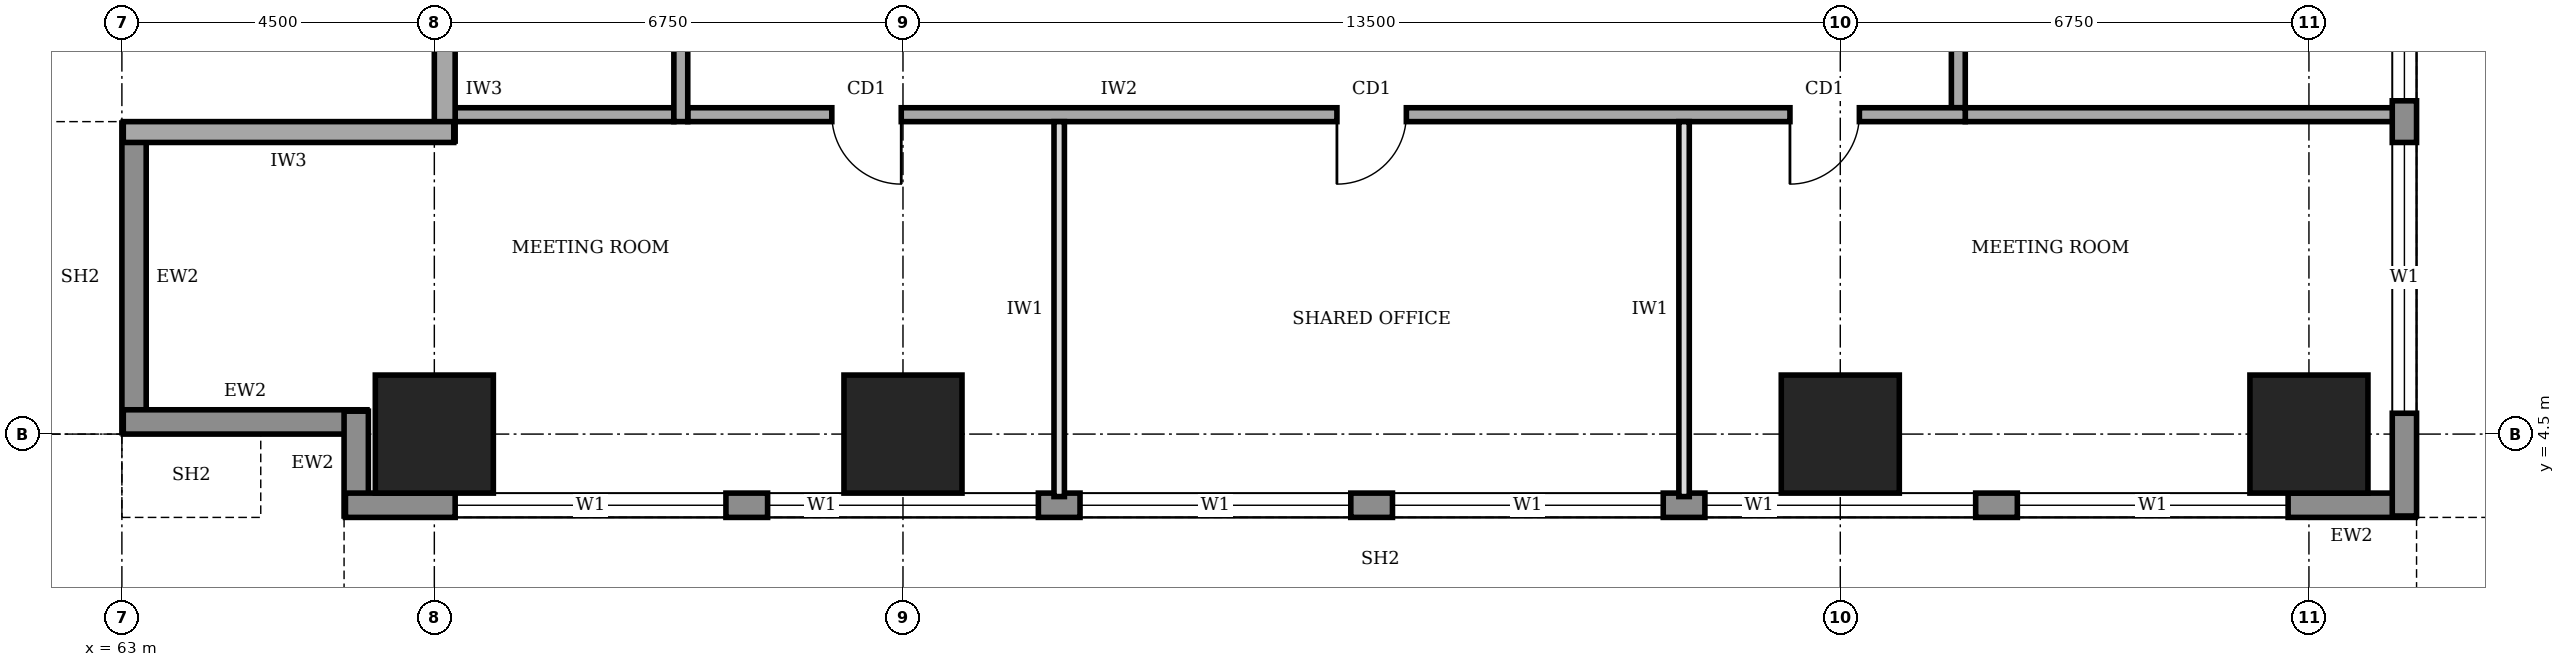
"""IFC4 building model, lengths in metres.
Left out: names, types, materials, properties, quantities, classifications, styles, units other than length and angle.
Written with IfcOpenShell. Run it as: python <this file> out.ifc"""

import sys

from ifc_helpers import new_model, si_unit, direction, frame, frame_2d, origin, origin_2d, place, context, subcontext, project, spatial, rectangle, extrude, element, fill, save


model = new_model("IFC4")
c1 = context("Model", 3, precision=1e-05, world=origin(), true_north=direction((0.0, 1.0)))
c2 = subcontext(c1, "Body", "Model", "MODEL_VIEW")
j1 = project(units=[si_unit("LENGTHUNIT", "METRE"), si_unit("PLANEANGLEUNIT", "RADIAN")], contexts=[c1])
p1 = place(None, origin())
s1 = spatial("IfcSite", under=j1, at=p1, CompositionType="ELEMENT")
p2 = place(p1, origin())
s2 = spatial("IfcBuilding", under=s1, at=p2, CompositionType="ELEMENT")
p3 = place(p2, frame((0.0, 0.0, 125.0)))
s3 = spatial("IfcBuildingStorey", under=s2, at=p3, CompositionType="ELEMENT", Elevation=125.0)
for number, where, z_axis, x_axis in (
    (1, (67.5, 4.5, 0.0), (0.0, 0.0, 1.0), (1.0, 0.0, 0.0)),
    (2, (74.25, 4.5, 0.0), (0.0, 0.0, 1.0), (1.0, 0.0, 0.0)),
    (3, (87.75, 4.5, 0.0), (0.0, 0.0, 1.0), (1.0, 0.0, 0.0)),
    (4, (94.5, 4.5, 0.0), (0.0, 0.0, 1.0), (1.0, 0.0, 0.0)),
):
    element("IfcColumn", number, at=place(p3, frame(where, z_axis=z_axis, x_axis=x_axis)), inside=s3, PredefinedType="COLUMN", context=c2, shape_type="SweptSolid", body=[
        extrude(rectangle(XDim=1.7, YDim=1.7, at=origin_2d()), origin(), (0.0, 0.0, 1.0), 4.0),
    ])
p4 = place(p3, frame((63.175, 8.98, 0.0), z_axis=(0.0, 0.0, 1.0), x_axis=(0.0, -1.0, 0.0)))
e5 = element("IfcWall", 5, at=p4, inside=s3, PredefinedType="STANDARD", context=c2, shape_type="SweptSolid", body=[
    extrude(rectangle(XDim=4.46, YDim=0.35, at=frame_2d((2.23, 0.0))), origin(), (0.0, 0.0, 1.0), 3.75),
])
p5 = place(p3, frame((63.02, 4.675, 0.0), z_axis=(0.0, 0.0, 1.0), x_axis=(1.0, 0.0, 0.0)))
e6 = element("IfcWall", 6, at=p5, inside=s3, PredefinedType="STANDARD", context=c2, shape_type="SweptSolid", body=[
    extrude(rectangle(XDim=3.51, YDim=0.35, at=frame_2d((1.755, 0.0))), origin(), (0.0, 0.0, 1.0), 2.85),
])
p6 = place(p3, frame((66.375, 4.83, 0.0), z_axis=(0.0, 0.0, 1.0), x_axis=(0.0, -1.0, 0.0)))
e7 = element("IfcWall", 7, at=p6, inside=s3, PredefinedType="STANDARD", context=c2, shape_type="SweptSolid", body=[
    extrude(rectangle(XDim=1.51, YDim=0.35, at=frame_2d((0.755, 0.0))), origin(), (0.0, 0.0, 1.0), 3.75),
])
p7 = place(p3, frame((66.22, 3.475, 0.0), z_axis=(0.0, 0.0, 1.0), x_axis=(1.0, 0.0, 0.0)))
e8 = element("IfcWall", 8, at=p7, inside=s3, PredefinedType="STANDARD", context=c2, shape_type="SweptSolid", body=[
    extrude(rectangle(XDim=29.81, YDim=0.35, at=frame_2d((14.905, 0.0))), origin(), (0.0, 0.0, 1.0), 3.75),
])
p8 = place(p7, frame((1.58, 0.0, 0.9)))
e9 = element("IfcOpeningElement", 9, at=p8, cuts=e8, PredefinedType="OPENING", context=c2, shape_type="SweptSolid", body=[
    extrude(rectangle(XDim=3.9, YDim=2.2, at=frame_2d((1.95, 1.1))), frame((0.0, 0.185, 0.0), z_axis=(0.0, -1.0, 0.0), x_axis=(1.0, 0.0, 0.0)), (0.0, 0.0, 1.0), 0.37),
])
p9 = place(p7, frame((6.08, 0.0, 0.9)))
e10 = element("IfcOpeningElement", 10, at=p9, cuts=e8, PredefinedType="OPENING", context=c2, shape_type="SweptSolid", body=[
    extrude(rectangle(XDim=3.9, YDim=2.2, at=frame_2d((1.95, 1.1))), frame((0.0, 0.185, 0.0), z_axis=(0.0, -1.0, 0.0), x_axis=(1.0, 0.0, 0.0)), (0.0, 0.0, 1.0), 0.37),
])
p10 = place(p7, frame((10.58, 0.0, 0.9)))
e11 = element("IfcOpeningElement", 11, at=p10, cuts=e8, PredefinedType="OPENING", context=c2, shape_type="SweptSolid", body=[
    extrude(rectangle(XDim=3.9, YDim=2.2, at=frame_2d((1.95, 1.1))), frame((0.0, 0.185, 0.0), z_axis=(0.0, -1.0, 0.0), x_axis=(1.0, 0.0, 0.0)), (0.0, 0.0, 1.0), 0.37),
])
p11 = place(p7, frame((15.08, 0.0, 0.9)))
e12 = element("IfcOpeningElement", 12, at=p11, cuts=e8, PredefinedType="OPENING", context=c2, shape_type="SweptSolid", body=[
    extrude(rectangle(XDim=3.9, YDim=2.2, at=frame_2d((1.95, 1.1))), frame((0.0, 0.185, 0.0), z_axis=(0.0, -1.0, 0.0), x_axis=(1.0, 0.0, 0.0)), (0.0, 0.0, 1.0), 0.37),
])
p12 = place(p7, frame((19.58, 0.0, 0.9)))
e13 = element("IfcOpeningElement", 13, at=p12, cuts=e8, PredefinedType="OPENING", context=c2, shape_type="SweptSolid", body=[
    extrude(rectangle(XDim=3.9, YDim=2.2, at=frame_2d((1.95, 1.1))), frame((0.0, 0.185, 0.0), z_axis=(0.0, -1.0, 0.0), x_axis=(1.0, 0.0, 0.0)), (0.0, 0.0, 1.0), 0.37),
])
p13 = place(p7, frame((24.08, 0.0, 0.9)))
e14 = element("IfcOpeningElement", 14, at=p13, cuts=e8, PredefinedType="OPENING", context=c2, shape_type="SweptSolid", body=[
    extrude(rectangle(XDim=3.9, YDim=2.2, at=frame_2d((1.95, 1.1))), frame((0.0, 0.185, 0.0), z_axis=(0.0, -1.0, 0.0), x_axis=(1.0, 0.0, 0.0)), (0.0, 0.0, 1.0), 0.37),
])
p14 = place(p3, frame((95.875, 3.32, 0.0), z_axis=(0.0, 0.0, 1.0), x_axis=(0.0, 1.0, 0.0)))
e15 = element("IfcWall", 15, at=p14, inside=s3, PredefinedType="STANDARD", context=c2, shape_type="SweptSolid", body=[
    extrude(rectangle(XDim=33.96, YDim=0.35, at=frame_2d((16.98, 0.0))), origin(), (0.0, 0.0, 1.0), 3.75),
])
p15 = place(p14, frame((1.48, 0.0, 0.9)))
e16 = element("IfcOpeningElement", 16, at=p15, cuts=e15, PredefinedType="OPENING", context=c2, shape_type="SweptSolid", body=[
    extrude(rectangle(XDim=3.9, YDim=2.2, at=frame_2d((1.95, 1.1))), frame((0.0, 0.185, 0.0), z_axis=(0.0, -1.0, 0.0), x_axis=(1.0, 0.0, 0.0)), (0.0, 0.0, 1.0), 0.37),
])
p16 = place(p14, frame((5.98, 0.0, 0.9)))
e17 = element("IfcOpeningElement", 17, at=p16, cuts=e15, PredefinedType="OPENING", context=c2, shape_type="SweptSolid", body=[
    extrude(rectangle(XDim=3.9, YDim=2.2, at=frame_2d((1.95, 1.1))), frame((0.0, 0.185, 0.0), z_axis=(0.0, -1.0, 0.0), x_axis=(1.0, 0.0, 0.0)), (0.0, 0.0, 1.0), 0.37),
])
p17 = place(p14, frame((10.48, 0.0, 0.9)))
e18 = element("IfcOpeningElement", 18, at=p17, cuts=e15, PredefinedType="OPENING", context=c2, shape_type="SweptSolid", body=[
    extrude(rectangle(XDim=3.9, YDim=2.2, at=frame_2d((1.95, 1.1))), frame((0.0, 0.185, 0.0), z_axis=(0.0, -1.0, 0.0), x_axis=(1.0, 0.0, 0.0)), (0.0, 0.0, 1.0), 0.37),
])
p18 = place(p14, frame((14.98, 0.0, 0.9)))
e19 = element("IfcOpeningElement", 19, at=p18, cuts=e15, PredefinedType="OPENING", context=c2, shape_type="SweptSolid", body=[
    extrude(rectangle(XDim=3.9, YDim=2.2, at=frame_2d((1.95, 1.1))), frame((0.0, 0.185, 0.0), z_axis=(0.0, -1.0, 0.0), x_axis=(1.0, 0.0, 0.0)), (0.0, 0.0, 1.0), 0.37),
])
p19 = place(p14, frame((19.48, 0.0, 0.9)))
e20 = element("IfcOpeningElement", 20, at=p19, cuts=e15, PredefinedType="OPENING", context=c2, shape_type="SweptSolid", body=[
    extrude(rectangle(XDim=3.9, YDim=2.2, at=frame_2d((1.95, 1.1))), frame((0.0, 0.185, 0.0), z_axis=(0.0, -1.0, 0.0), x_axis=(1.0, 0.0, 0.0)), (0.0, 0.0, 1.0), 0.37),
])
p20 = place(p14, frame((23.98, 0.0, 0.9)))
e21 = element("IfcOpeningElement", 21, at=p20, cuts=e15, PredefinedType="OPENING", context=c2, shape_type="SweptSolid", body=[
    extrude(rectangle(XDim=3.9, YDim=2.2, at=frame_2d((1.95, 1.1))), frame((0.0, 0.185, 0.0), z_axis=(0.0, -1.0, 0.0), x_axis=(1.0, 0.0, 0.0)), (0.0, 0.0, 1.0), 0.37),
])
p21 = place(p14, frame((28.48, 0.0, 0.9)))
e22 = element("IfcOpeningElement", 22, at=p21, cuts=e15, PredefinedType="OPENING", context=c2, shape_type="SweptSolid", body=[
    extrude(rectangle(XDim=3.9, YDim=2.2, at=frame_2d((1.95, 1.1))), frame((0.0, 0.185, 0.0), z_axis=(0.0, -1.0, 0.0), x_axis=(1.0, 0.0, 0.0)), (0.0, 0.0, 1.0), 0.37),
])
p22 = place(p3, frame((67.65, 10.2, 0.0), z_axis=(0.0, 0.0, 1.0), x_axis=(0.0, -1.0, 0.0)))
e23 = element("IfcWall", 23, at=p22, inside=s3, PredefinedType="SOLIDWALL", context=c2, shape_type="SweptSolid", body=[
    extrude(rectangle(XDim=1.48, YDim=0.3, at=frame_2d((0.74, 0.0))), origin(), (0.0, 0.0, 1.0), 2.65),
])
p23 = place(p3, frame((67.78, 8.85, 0.0), z_axis=(0.0, 0.0, 1.0), x_axis=(-1.0, 0.0, 0.0)))
e24 = element("IfcWall", 24, at=p23, inside=s3, PredefinedType="SOLIDWALL", context=c2, shape_type="SweptSolid", body=[
    extrude(rectangle(XDim=4.76, YDim=0.3, at=frame_2d((2.38, 0.0))), origin(), (0.0, 0.0, 1.0), 3.75),
])
p24 = place(p3, frame((71.15, 9.1, 0.0), z_axis=(0.0, 0.0, 1.0), x_axis=(1.0, 0.0, 0.0)))
e25 = element("IfcWall", 25, at=p24, inside=s3, PredefinedType="SOLIDWALL", context=c2, shape_type="SweptSolid", body=[
    extrude(rectangle(XDim=18.4, YDim=0.2, at=frame_2d((9.2, 0.0))), origin(), (0.0, 0.0, 1.0), 3.75),
])
p25 = place(p24, frame((2.075, 0.0, 0.0)))
e26 = element("IfcOpeningElement", 26, at=p25, cuts=e25, PredefinedType="OPENING", context=c2, shape_type="SweptSolid", body=[
    extrude(rectangle(XDim=1.0, YDim=2.1, at=frame_2d((0.5, 1.05))), frame((0.0, 0.11, 0.0), z_axis=(0.0, -1.0, 0.0), x_axis=(1.0, 0.0, 0.0)), (0.0, 0.0, 1.0), 0.22),
])
p26 = place(p24, frame((9.35, 0.0, 0.0)))
e27 = element("IfcOpeningElement", 27, at=p26, cuts=e25, PredefinedType="OPENING", context=c2, shape_type="SweptSolid", body=[
    extrude(rectangle(XDim=1.0, YDim=2.1, at=frame_2d((0.5, 1.05))), frame((0.0, 0.11, 0.0), z_axis=(0.0, -1.0, 0.0), x_axis=(1.0, 0.0, 0.0)), (0.0, 0.0, 1.0), 0.22),
])
p27 = place(p24, frame((15.875, 0.0, 0.0)))
e28 = element("IfcOpeningElement", 28, at=p27, cuts=e25, PredefinedType="OPENING", context=c2, shape_type="SweptSolid", body=[
    extrude(rectangle(XDim=1.0, YDim=2.1, at=frame_2d((0.5, 1.05))), frame((0.0, 0.11, 0.0), z_axis=(0.0, -1.0, 0.0), x_axis=(1.0, 0.0, 0.0)), (0.0, 0.0, 1.0), 0.22),
])
p28 = place(p3, frame((89.45, 9.2, 0.0), z_axis=(0.0, 0.0, 1.0), x_axis=(0.0, 1.0, 0.0)))
e29 = element("IfcWall", 29, at=p28, inside=s3, PredefinedType="SOLIDWALL", context=c2, shape_type="SweptSolid", body=[
    extrude(rectangle(XDim=22.3, YDim=0.2, at=frame_2d((11.15, 0.0))), origin(), (0.0, 0.0, 1.0), 3.75),
])
p29 = place(p28, frame((1.625, 0.0, 0.0)))
e30 = element("IfcOpeningElement", 30, at=p29, cuts=e29, PredefinedType="OPENING", context=c2, shape_type="SweptSolid", body=[
    extrude(rectangle(XDim=1.0, YDim=2.1, at=frame_2d((0.5, 1.05))), frame((0.0, 0.11, 0.0), z_axis=(0.0, -1.0, 0.0), x_axis=(1.0, 0.0, 0.0)), (0.0, 0.0, 1.0), 0.22),
])
p30 = place(p28, frame((5.825, 0.0, 0.0)))
e31 = element("IfcOpeningElement", 31, at=p30, cuts=e29, PredefinedType="OPENING", context=c2, shape_type="SweptSolid", body=[
    extrude(rectangle(XDim=0.9, YDim=2.1, at=frame_2d((0.45, 1.05))), frame((0.0, 0.11, 0.0), z_axis=(0.0, -1.0, 0.0), x_axis=(1.0, 0.0, 0.0)), (0.0, 0.0, 1.0), 0.22),
])
p31 = place(p28, frame((8.75, 0.0, 0.0)))
e32 = element("IfcOpeningElement", 32, at=p31, cuts=e29, PredefinedType="OPENING", context=c2, shape_type="SweptSolid", body=[
    extrude(rectangle(XDim=0.9, YDim=2.1, at=frame_2d((0.45, 1.05))), frame((0.0, 0.11, 0.0), z_axis=(0.0, -1.0, 0.0), x_axis=(1.0, 0.0, 0.0)), (0.0, 0.0, 1.0), 0.22),
])
p32 = place(p28, frame((13.525, 0.0, 0.0)))
e33 = element("IfcOpeningElement", 33, at=p32, cuts=e29, PredefinedType="OPENING", context=c2, shape_type="SweptSolid", body=[
    extrude(rectangle(XDim=0.9, YDim=2.1, at=frame_2d((0.45, 1.05))), frame((0.0, 0.11, 0.0), z_axis=(0.0, -1.0, 0.0), x_axis=(1.0, 0.0, 0.0)), (0.0, 0.0, 1.0), 0.22),
])
p33 = place(p28, frame((16.15, 0.0, 0.0)))
e34 = element("IfcOpeningElement", 34, at=p33, cuts=e29, PredefinedType="OPENING", context=c2, shape_type="SweptSolid", body=[
    extrude(rectangle(XDim=1.0, YDim=2.1, at=frame_2d((0.5, 1.05))), frame((0.0, 0.11, 0.0), z_axis=(0.0, -1.0, 0.0), x_axis=(1.0, 0.0, 0.0)), (0.0, 0.0, 1.0), 0.22),
])
p34 = place(p28, frame((10.8, 0.0, 0.0)))
e35 = element("IfcOpeningElement", 35, at=p34, cuts=e29, PredefinedType="OPENING", context=c2, shape_type="SweptSolid", body=[
    extrude(rectangle(XDim=1.0, YDim=2.1, at=frame_2d((0.5, 1.05))), frame((0.0, 0.11, 0.0), z_axis=(0.0, -1.0, 0.0), x_axis=(1.0, 0.0, 0.0)), (0.0, 0.0, 1.0), 0.22),
])
p35 = place(p28, frame((19.475, 0.0, 0.0)))
e36 = element("IfcOpeningElement", 36, at=p35, cuts=e29, PredefinedType="OPENING", context=c2, shape_type="SweptSolid", body=[
    extrude(rectangle(XDim=1.0, YDim=2.1, at=frame_2d((0.5, 1.05))), frame((0.0, 0.11, 0.0), z_axis=(0.0, -1.0, 0.0), x_axis=(1.0, 0.0, 0.0)), (0.0, 0.0, 1.0), 0.22),
])
p36 = place(p3, frame((71.05, 31.3, 0.0), z_axis=(0.0, 0.0, 1.0), x_axis=(0.0, -1.0, 0.0)))
e37 = element("IfcWall", 37, at=p36, inside=s3, PredefinedType="SOLIDWALL", context=c2, shape_type="SweptSolid", body=[
    extrude(rectangle(XDim=22.3, YDim=0.2, at=frame_2d((11.15, 0.0))), origin(), (0.0, 0.0, 1.0), 3.75),
])
p37 = place(p36, frame((10.15, 0.0, 0.0)))
e38 = element("IfcOpeningElement", 38, at=p37, cuts=e37, PredefinedType="OPENING", context=c2, shape_type="SweptSolid", body=[
    extrude(rectangle(XDim=1.8, YDim=2.1, at=frame_2d((0.9, 1.05))), frame((0.0, 0.11, 0.0), z_axis=(0.0, -1.0, 0.0), x_axis=(1.0, 0.0, 0.0)), (0.0, 0.0, 1.0), 0.22),
])
p38 = place(p3, frame((67.8, 9.1, 0.0), z_axis=(0.0, 0.0, 1.0), x_axis=(1.0, 0.0, 0.0)))
e39 = element("IfcWall", 39, at=p38, inside=s3, PredefinedType="SOLIDWALL", context=c2, shape_type="SweptSolid", body=[
    extrude(rectangle(XDim=3.15, YDim=0.2, at=frame_2d((1.575, 0.0))), origin(), (0.0, 0.0, 1.0), 3.75),
])
p39 = place(p3, frame((89.55, 9.1, 0.0), z_axis=(0.0, 0.0, 1.0), x_axis=(1.0, 0.0, 0.0)))
e40 = element("IfcWall", 40, at=p39, inside=s3, PredefinedType="SOLIDWALL", context=c2, shape_type="SweptSolid", body=[
    extrude(rectangle(XDim=6.2, YDim=0.2, at=frame_2d((3.1, 0.0))), origin(), (0.0, 0.0, 1.0), 3.75),
])
for number, where, z_axis, x_axis in (
    (41, (76.5, 3.6, 0.0), (0.0, 0.0, 1.0), (0.0, 1.0, 0.0)),
    (42, (85.5, 3.6, 0.0), (0.0, 0.0, 1.0), (0.0, 1.0, 0.0)),
):
    element("IfcWall", number, at=place(p3, frame(where, z_axis=z_axis, x_axis=x_axis)), inside=s3, PredefinedType="PARTITIONING", context=c2, shape_type="SweptSolid", body=[
        extrude(rectangle(XDim=5.4, YDim=0.15, at=frame_2d((2.7, 0.0))), origin(), (0.0, 0.0, 1.0), 3.75),
    ])
p40 = place(p8, origin())
e43 = element("IfcWindow", 43, at=p40, inside=s3, PartitioningType="SINGLE_PANEL", PredefinedType="WINDOW", context=c2, shape_type="SweptSolid", body=[
    extrude(rectangle(XDim=3.9, YDim=2.2, at=frame_2d((1.95, 1.1))), frame((0.0, 0.03, 0.0), z_axis=(0.0, -1.0, 0.0), x_axis=(1.0, 0.0, 0.0)), (0.0, 0.0, 1.0), 0.06),
])
fill(e9, e43)
p41 = place(p9, origin())
e44 = element("IfcWindow", 44, at=p41, inside=s3, PartitioningType="SINGLE_PANEL", PredefinedType="WINDOW", context=c2, shape_type="SweptSolid", body=[
    extrude(rectangle(XDim=3.9, YDim=2.2, at=frame_2d((1.95, 1.1))), frame((0.0, 0.03, 0.0), z_axis=(0.0, -1.0, 0.0), x_axis=(1.0, 0.0, 0.0)), (0.0, 0.0, 1.0), 0.06),
])
fill(e10, e44)
p42 = place(p10, origin())
e45 = element("IfcWindow", 45, at=p42, inside=s3, PartitioningType="SINGLE_PANEL", PredefinedType="WINDOW", context=c2, shape_type="SweptSolid", body=[
    extrude(rectangle(XDim=3.9, YDim=2.2, at=frame_2d((1.95, 1.1))), frame((0.0, 0.03, 0.0), z_axis=(0.0, -1.0, 0.0), x_axis=(1.0, 0.0, 0.0)), (0.0, 0.0, 1.0), 0.06),
])
fill(e11, e45)
p43 = place(p11, origin())
e46 = element("IfcWindow", 46, at=p43, inside=s3, PartitioningType="SINGLE_PANEL", PredefinedType="WINDOW", context=c2, shape_type="SweptSolid", body=[
    extrude(rectangle(XDim=3.9, YDim=2.2, at=frame_2d((1.95, 1.1))), frame((0.0, 0.03, 0.0), z_axis=(0.0, -1.0, 0.0), x_axis=(1.0, 0.0, 0.0)), (0.0, 0.0, 1.0), 0.06),
])
fill(e12, e46)
p44 = place(p12, origin())
e47 = element("IfcWindow", 47, at=p44, inside=s3, PartitioningType="SINGLE_PANEL", PredefinedType="WINDOW", context=c2, shape_type="SweptSolid", body=[
    extrude(rectangle(XDim=3.9, YDim=2.2, at=frame_2d((1.95, 1.1))), frame((0.0, 0.03, 0.0), z_axis=(0.0, -1.0, 0.0), x_axis=(1.0, 0.0, 0.0)), (0.0, 0.0, 1.0), 0.06),
])
fill(e13, e47)
p45 = place(p13, origin())
e48 = element("IfcWindow", 48, at=p45, inside=s3, PartitioningType="SINGLE_PANEL", PredefinedType="WINDOW", context=c2, shape_type="SweptSolid", body=[
    extrude(rectangle(XDim=3.9, YDim=2.2, at=frame_2d((1.95, 1.1))), frame((0.0, 0.03, 0.0), z_axis=(0.0, -1.0, 0.0), x_axis=(1.0, 0.0, 0.0)), (0.0, 0.0, 1.0), 0.06),
])
fill(e14, e48)
p46 = place(p15, origin())
e49 = element("IfcWindow", 49, at=p46, inside=s3, PartitioningType="SINGLE_PANEL", PredefinedType="WINDOW", context=c2, shape_type="SweptSolid", body=[
    extrude(rectangle(XDim=3.9, YDim=2.2, at=frame_2d((1.95, 1.1))), frame((0.0, 0.03, 0.0), z_axis=(0.0, -1.0, 0.0), x_axis=(1.0, 0.0, 0.0)), (0.0, 0.0, 1.0), 0.06),
])
fill(e16, e49)
p47 = place(p16, origin())
e50 = element("IfcWindow", 50, at=p47, inside=s3, PartitioningType="SINGLE_PANEL", PredefinedType="WINDOW", context=c2, shape_type="SweptSolid", body=[
    extrude(rectangle(XDim=3.9, YDim=2.2, at=frame_2d((1.95, 1.1))), frame((0.0, 0.03, 0.0), z_axis=(0.0, -1.0, 0.0), x_axis=(1.0, 0.0, 0.0)), (0.0, 0.0, 1.0), 0.06),
])
fill(e17, e50)
p48 = place(p25, frame((1.0, 0.0, 0.0), z_axis=(0.0, 0.0, 1.0), x_axis=(-1.0, 0.0, 0.0)))
e51 = element("IfcDoor", 51, at=p48, inside=s3, OperationType="SINGLE_SWING_LEFT", PredefinedType="DOOR", context=c2, shape_type="SweptSolid", body=[
    extrude(rectangle(XDim=1.0, YDim=2.1, at=frame_2d((0.5, 1.05))), frame((0.0, 0.025, 0.0), z_axis=(0.0, -1.0, 0.0), x_axis=(1.0, 0.0, 0.0)), (0.0, 0.0, 1.0), 0.05),
])
fill(e26, e51)
p49 = place(p26, frame((1.0, 0.0, 0.0), z_axis=(0.0, 0.0, 1.0), x_axis=(-1.0, 0.0, 0.0)))
e52 = element("IfcDoor", 52, at=p49, inside=s3, OperationType="SINGLE_SWING_RIGHT", PredefinedType="DOOR", context=c2, shape_type="SweptSolid", body=[
    extrude(rectangle(XDim=1.0, YDim=2.1, at=frame_2d((0.5, 1.05))), frame((0.0, 0.025, 0.0), z_axis=(0.0, -1.0, 0.0), x_axis=(1.0, 0.0, 0.0)), (0.0, 0.0, 1.0), 0.05),
])
fill(e27, e52)
p50 = place(p27, frame((1.0, 0.0, 0.0), z_axis=(0.0, 0.0, 1.0), x_axis=(-1.0, 0.0, 0.0)))
e53 = element("IfcDoor", 53, at=p50, inside=s3, OperationType="SINGLE_SWING_RIGHT", PredefinedType="DOOR", context=c2, shape_type="SweptSolid", body=[
    extrude(rectangle(XDim=1.0, YDim=2.1, at=frame_2d((0.5, 1.05))), frame((0.0, 0.025, 0.0), z_axis=(0.0, -1.0, 0.0), x_axis=(1.0, 0.0, 0.0)), (0.0, 0.0, 1.0), 0.05),
])
fill(e28, e53)
save(model, sys.argv[1])
